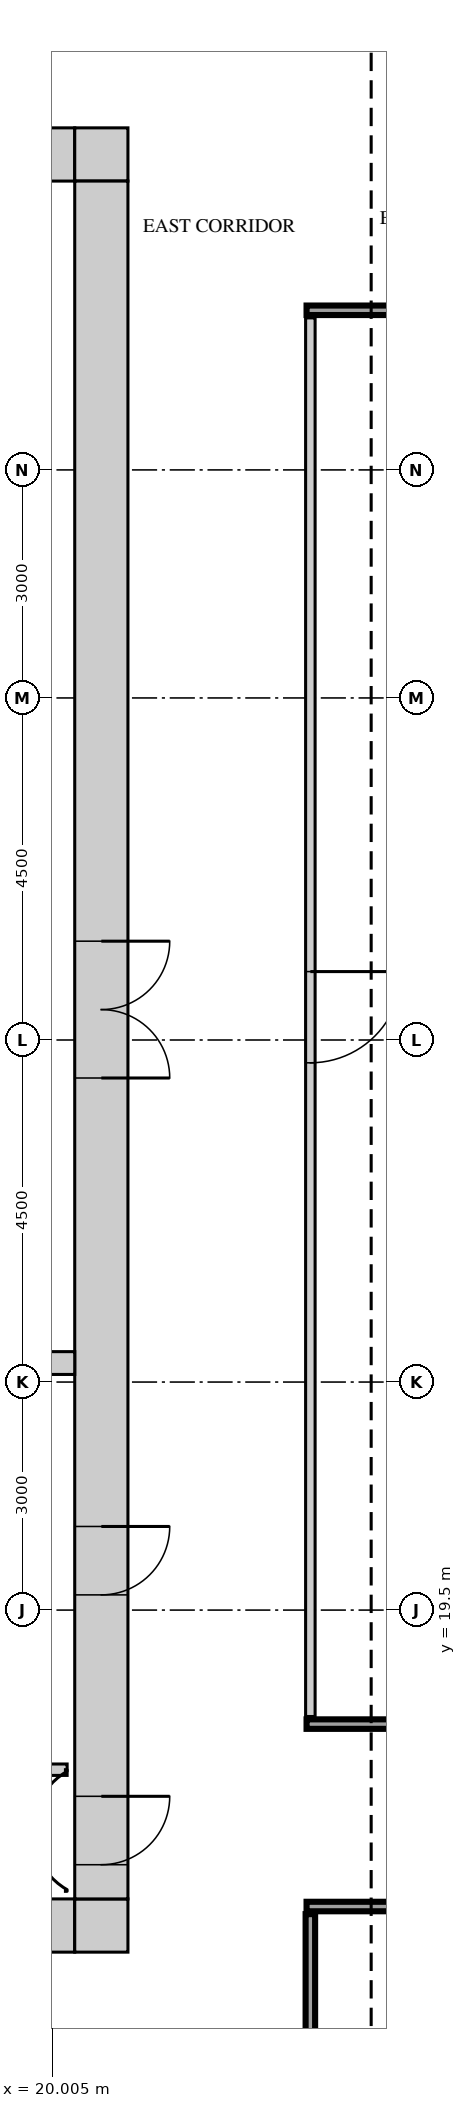
"""IFC4 building model, lengths in metres.
Left out: names, types, materials, properties, quantities, classifications, styles, units other than length and angle.
Written with IfcOpenShell. Run it as: python <this file> out.ifc"""

import sys

from ifc_helpers import new_model, si_unit, direction, frame, frame_2d, origin, place, context, subcontext, project, spatial, rectangle, extrude, source, transform, mapped, element, fill, save


model = new_model("IFC4")
c1 = context("Model", 3, precision=1e-05, world=origin(), true_north=direction((0.0, 1.0)))
c2 = subcontext(c1, "Body", "Model", "MODEL_VIEW")
j1 = project(units=[si_unit("LENGTHUNIT", "METRE"), si_unit("PLANEANGLEUNIT", "RADIAN")], contexts=[c1])
p1 = place(None, origin())
s1 = spatial("IfcSite", under=j1, at=p1, CompositionType="ELEMENT")
p2 = place(p1, origin())
s2 = spatial("IfcBuilding", under=s1, at=p2, CompositionType="ELEMENT")
p3 = place(p2, frame((0.0, 0.0, 270.2)))
s3 = spatial("IfcBuildingStorey", under=s2, at=p3, CompositionType="ELEMENT", Elevation=270.2)
m1 = source(origin(), c2, "Body", "SweptSolid", [
    extrude(rectangle(XDim=13.6, YDim=0.7, at=frame_2d((6.8, 0.0))), origin(), (0.0, 0.0, 1.0), 3.75),
])
p4 = place(p3, frame((6.7, 38.65, 0.0), z_axis=(0.0, 0.0, 1.0), x_axis=(1.0, 0.0, 0.0)))
e1 = element("IfcWall", 1, at=p4, inside=s3, PredefinedType="SHEAR", context=c2, shape_type="MappedRepresentation", body=[
    mapped(m1, transform((0.0, 0.0, 0.0))),
])
m2 = source(origin(), c2, "Body", "SweptSolid", [
    extrude(rectangle(XDim=0.9, YDim=2.1, at=frame_2d((0.45, 1.05))), frame((0.0, 0.36, 0.0), z_axis=(0.0, -1.0, 0.0), x_axis=(1.0, 0.0, 0.0)), (0.0, 0.0, 1.0), 0.72),
])
p5 = place(p4, frame((3.0, 0.0, 0.0)))
e2 = element("IfcOpeningElement", 2, at=p5, cuts=e1, PredefinedType="OPENING", context=c2, shape_type="MappedRepresentation", body=[
    mapped(m2, transform((0.0, 0.0, 0.0))),
])
p6 = place(p4, frame((8.0, 0.0, 0.0)))
e3 = element("IfcOpeningElement", 3, at=p6, cuts=e1, PredefinedType="OPENING", context=c2, shape_type="MappedRepresentation", body=[
    mapped(m2, transform((0.0, 0.0, 0.0))),
])
p7 = place(p4, frame((11.35, 0.0, 0.0)))
e4 = element("IfcOpeningElement", 4, at=p7, cuts=e1, PredefinedType="OPENING", context=c2, shape_type="MappedRepresentation", body=[
    mapped(m2, transform((0.0, 0.0, 0.0))),
])
m3 = source(origin(), c2, "Body", "SweptSolid", [
    extrude(rectangle(XDim=0.7, YDim=0.7, at=frame_2d((0.35, 0.0))), origin(), (0.0, 0.0, 1.0), 3.75),
])
p8 = place(p3, frame((20.3, 38.65, 0.0), z_axis=(0.0, 0.0, 1.0), x_axis=(1.0, 0.0, 0.0)))
e5 = element("IfcWall", 5, at=p8, inside=s3, PredefinedType="SHEAR", context=c2, shape_type="MappedRepresentation", body=[
    mapped(m3, transform((0.0, 0.0, 0.0))),
])
p9 = place(p3, frame((6.7, 15.35, 0.0), z_axis=(0.0, 0.0, 1.0), x_axis=(1.0, 0.0, 0.0)))
e6 = element("IfcWall", 6, at=p9, inside=s3, PredefinedType="SHEAR", context=c2, shape_type="MappedRepresentation", body=[
    mapped(m1, transform((0.0, 0.0, 0.0))),
])
m4 = source(origin(), c2, "Body", "SweptSolid", [
    extrude(rectangle(XDim=1.2, YDim=2.1, at=frame_2d((0.6, 1.05))), frame((0.0, 0.36, 0.0), z_axis=(0.0, -1.0, 0.0), x_axis=(1.0, 0.0, 0.0)), (0.0, 0.0, 1.0), 0.72),
])
p10 = place(p9, frame((5.5, 0.0, 0.0)))
e7 = element("IfcOpeningElement", 7, at=p10, cuts=e6, PredefinedType="OPENING", context=c2, shape_type="MappedRepresentation", body=[
    mapped(m4, transform((0.0, 0.0, 0.0))),
])
p11 = place(p9, frame((2.15, 0.0, 0.0)))
e8 = element("IfcOpeningElement", 8, at=p11, cuts=e6, PredefinedType="OPENING", context=c2, shape_type="MappedRepresentation", body=[
    mapped(m4, transform((0.0, 0.0, 0.0))),
])
m5 = source(origin(), c2, "Body", "SweptSolid", [
    extrude(rectangle(XDim=1.0, YDim=2.1, at=frame_2d((0.5, 1.05))), frame((0.0, 0.36, 0.0), z_axis=(0.0, -1.0, 0.0), x_axis=(1.0, 0.0, 0.0)), (0.0, 0.0, 1.0), 0.72),
])
p12 = place(p9, frame((8.0, 0.0, 0.0)))
e9 = element("IfcOpeningElement", 9, at=p12, cuts=e6, PredefinedType="OPENING", context=c2, shape_type="MappedRepresentation", body=[
    mapped(m5, transform((0.0, 0.0, 0.0))),
])
p13 = place(p3, frame((20.3, 15.35, 0.0), z_axis=(0.0, 0.0, 1.0), x_axis=(1.0, 0.0, 0.0)))
e10 = element("IfcWall", 10, at=p13, inside=s3, PredefinedType="SHEAR", context=c2, shape_type="MappedRepresentation", body=[
    mapped(m3, transform((0.0, 0.0, 0.0))),
])
m6 = source(origin(), c2, "Body", "SweptSolid", [
    extrude(rectangle(XDim=22.6, YDim=0.7, at=frame_2d((11.3, 0.0))), origin(), (0.0, 0.0, 1.0), 3.75),
])
p14 = place(p3, frame((20.65, 15.7, 0.0), z_axis=(0.0, 0.0, 1.0), x_axis=(0.0, 1.0, 0.0)))
e11 = element("IfcWall", 11, at=p14, inside=s3, PredefinedType="SHEAR", context=c2, shape_type="MappedRepresentation", body=[
    mapped(m6, transform((0.0, 0.0, 0.0))),
])
m7 = source(origin(), c2, "Body", "SweptSolid", [
    extrude(rectangle(XDim=1.8, YDim=2.1, at=frame_2d((0.9, 1.05))), frame((0.0, 0.36, 0.0), z_axis=(0.0, -1.0, 0.0), x_axis=(1.0, 0.0, 0.0)), (0.0, 0.0, 1.0), 0.72),
])
p15 = place(p14, frame((10.8, 0.0, 0.0)))
e12 = element("IfcOpeningElement", 12, at=p15, cuts=e11, PredefinedType="OPENING", context=c2, shape_type="MappedRepresentation", body=[
    mapped(m7, transform((0.0, 0.0, 0.0))),
])
p16 = place(p14, frame((0.45, 0.0, 0.0)))
e13 = element("IfcOpeningElement", 13, at=p16, cuts=e11, PredefinedType="OPENING", context=c2, shape_type="MappedRepresentation", body=[
    mapped(m2, transform((0.0, 0.0, 0.0))),
])
p17 = place(p14, frame((4.0, 0.0, 0.0)))
e14 = element("IfcOpeningElement", 14, at=p17, cuts=e11, PredefinedType="OPENING", context=c2, shape_type="MappedRepresentation", body=[
    mapped(m2, transform((0.0, 0.0, 0.0))),
])
m8 = source(origin(), c2, "Body", "SweptSolid", [
    extrude(rectangle(XDim=13.6, YDim=0.3, at=frame_2d((6.8, 0.0))), origin(), (0.0, 0.0, 1.0), 3.75),
])
p18 = place(p3, frame((6.7, 22.75, 0.0), z_axis=(0.0, 0.0, 1.0), x_axis=(1.0, 0.0, 0.0)))
e15 = element("IfcWall", 15, at=p18, inside=s3, PredefinedType="STANDARD", context=c2, shape_type="MappedRepresentation", body=[
    mapped(m8, transform((0.0, 0.0, 0.0))),
])
m9 = source(origin(), c2, "Body", "SweptSolid", [
    extrude(rectangle(XDim=10.85, YDim=0.125, at=frame_2d((5.425, 0.0))), origin(), (0.0, 0.0, 1.0), 3.8),
])
p19 = place(p3, frame((23.4, 4.65, 0.0), z_axis=(0.0, 0.0, 1.0), x_axis=(0.0, 1.0, 0.0)))
e16 = element("IfcWall", 16, at=p19, inside=s3, PredefinedType="PARTITIONING", context=c2, shape_type="MappedRepresentation", body=[
    mapped(m9, transform((0.0, 0.0, 0.0))),
])
m10 = source(origin(), c2, "Body", "SweptSolid", [
    extrude(rectangle(XDim=0.9, YDim=2.1, at=frame_2d((0.45, 1.05))), frame((0.0, 0.073, 0.0), z_axis=(0.0, -1.0, 0.0), x_axis=(1.0, 0.0, 0.0)), (0.0, 0.0, 1.0), 0.145),
])
p20 = place(p19, frame((4.5, 0.0, 0.0)))
e17 = element("IfcOpeningElement", 17, at=p20, cuts=e16, PredefinedType="OPENING", context=c2, shape_type="MappedRepresentation", body=[
    mapped(m10, transform((0.0, 0.0, 0.0))),
])
m11 = source(origin(), c2, "Body", "SweptSolid", [
    extrude(rectangle(XDim=26.0, YDim=0.125, at=frame_2d((13.0, 0.0))), origin(), (0.0, 0.0, 1.0), 3.8),
])
p21 = place(p3, frame((23.35, 15.6, 0.0), z_axis=(0.0, 0.0, 1.0), x_axis=(1.0, 0.0, 0.0)))
e18 = element("IfcWall", 18, at=p21, inside=s3, PredefinedType="PARTITIONING", context=c2, shape_type="MappedRepresentation", body=[
    mapped(m11, transform((0.0, 0.0, 0.0))),
])
p22 = place(p21, frame((4.05, 0.0, 0.0)))
e19 = element("IfcOpeningElement", 19, at=p22, cuts=e18, PredefinedType="OPENING", context=c2, shape_type="MappedRepresentation", body=[
    mapped(m10, transform((0.0, 0.0, 0.0))),
])
m12 = source(origin(), c2, "Body", "SweptSolid", [
    extrude(rectangle(XDim=1.0, YDim=2.1, at=frame_2d((0.5, 1.05))), frame((0.0, 0.073, 0.0), z_axis=(0.0, -1.0, 0.0), x_axis=(1.0, 0.0, 0.0)), (0.0, 0.0, 1.0), 0.145),
])
p23 = place(p21, frame((6.85, 0.0, 0.0)))
e20 = element("IfcOpeningElement", 20, at=p23, cuts=e18, PredefinedType="OPENING", context=c2, shape_type="MappedRepresentation", body=[
    mapped(m12, transform((0.0, 0.0, 0.0))),
])
p24 = place(p21, frame((12.3, 0.0, 0.0)))
e21 = element("IfcOpeningElement", 21, at=p24, cuts=e18, PredefinedType="OPENING", context=c2, shape_type="MappedRepresentation", body=[
    mapped(m10, transform((0.0, 0.0, 0.0))),
])
m13 = source(origin(), c2, "Body", "SweptSolid", [
    extrude(rectangle(XDim=1.2, YDim=2.1, at=frame_2d((0.6, 1.05))), frame((0.0, 0.073, 0.0), z_axis=(0.0, -1.0, 0.0), x_axis=(1.0, 0.0, 0.0)), (0.0, 0.0, 1.0), 0.145),
])
p25 = place(p21, frame((20.8, 0.0, 0.0)))
e22 = element("IfcOpeningElement", 22, at=p25, cuts=e18, PredefinedType="OPENING", context=c2, shape_type="MappedRepresentation", body=[
    mapped(m13, transform((0.0, 0.0, 0.0))),
])
m14 = source(origin(), c2, "Body", "SweptSolid", [
    extrude(rectangle(XDim=4.0, YDim=0.15, at=frame_2d((2.0, 0.0))), origin(), (0.0, 0.0, 1.0), 3.8),
])
p26 = place(p3, frame((16.2, 17.4, 0.0), z_axis=(0.0, 0.0, 1.0), x_axis=(1.0, 0.0, 0.0)))
e23 = element("IfcWall", 23, at=p26, inside=s3, PredefinedType="PARTITIONING", context=c2, shape_type="MappedRepresentation", body=[
    mapped(m14, transform((0.0, 0.0, 0.0))),
])
p27 = place(p3, frame((23.35, 18.0, 0.0), z_axis=(0.0, 0.0, 1.0), x_axis=(1.0, 0.0, 0.0)))
e24 = element("IfcWall", 24, at=p27, inside=s3, PredefinedType="PARTITIONING", context=c2, shape_type="MappedRepresentation", body=[
    mapped(m11, transform((0.0, 0.0, 0.0))),
])
p28 = place(p27, frame((19.55, 0.0, 0.0)))
e25 = element("IfcOpeningElement", 25, at=p28, cuts=e24, PredefinedType="OPENING", context=c2, shape_type="MappedRepresentation", body=[
    mapped(m13, transform((0.0, 0.0, 0.0))),
])
m15 = source(origin(), c2, "Body", "SweptSolid", [
    extrude(rectangle(XDim=18.4, YDim=0.125, at=frame_2d((9.2, 0.0))), origin(), (0.0, 0.0, 1.0), 3.8),
])
p29 = place(p3, frame((23.4, 18.1, 0.0), z_axis=(0.0, 0.0, 1.0), x_axis=(0.0, 1.0, 0.0)))
e26 = element("IfcWall", 26, at=p29, inside=s3, PredefinedType="PARTITIONING", context=c2, shape_type="MappedRepresentation", body=[
    mapped(m15, transform((0.0, 0.0, 0.0))),
])
p30 = place(p29, frame((8.6, 0.0, 0.0)))
e27 = element("IfcOpeningElement", 27, at=p30, cuts=e26, PredefinedType="OPENING", context=c2, shape_type="MappedRepresentation", body=[
    mapped(m13, transform((0.0, 0.0, 0.0))),
])
p31 = place(p3, frame((23.35, 36.6, 0.0), z_axis=(0.0, 0.0, 1.0), x_axis=(1.0, 0.0, 0.0)))
e28 = element("IfcWall", 28, at=p31, inside=s3, PredefinedType="PARTITIONING", context=c2, shape_type="MappedRepresentation", body=[
    mapped(m11, transform((0.0, 0.0, 0.0))),
])
m16 = source(origin(), c2, "Body", "SweptSolid", [
    extrude(rectangle(XDim=1.8, YDim=2.1, at=frame_2d((0.9, 1.05))), frame((0.0, 0.3, 0.0), z_axis=(0.0, -1.0, 0.0), x_axis=(1.0, 0.0, 0.0)), (0.0, 0.0, 1.0), 0.6),
])
p32 = place(p15, origin())
e29 = element("IfcDoor", 29, at=p32, inside=s3, OperationType="DOUBLE_DOOR_SINGLE_SWING", PredefinedType="DOOR", context=c2, shape_type="MappedRepresentation", body=[
    mapped(m16, transform((0.0, 0.0, 0.0))),
])
fill(e12, e29)
m17 = source(origin(), c2, "Body", "SweptSolid", [
    extrude(rectangle(XDim=0.9, YDim=2.1, at=frame_2d((0.45, 1.05))), frame((0.0, 0.3, 0.0), z_axis=(0.0, -1.0, 0.0), x_axis=(1.0, 0.0, 0.0)), (0.0, 0.0, 1.0), 0.6),
])
p33 = place(p16, origin())
e30 = element("IfcDoor", 30, at=p33, inside=s3, OperationType="SINGLE_SWING_RIGHT", PredefinedType="DOOR", context=c2, shape_type="MappedRepresentation", body=[
    mapped(m17, transform((0.0, 0.0, 0.0))),
])
fill(e13, e30)
p34 = place(p17, origin())
e31 = element("IfcDoor", 31, at=p34, inside=s3, OperationType="SINGLE_SWING_RIGHT", PredefinedType="DOOR", context=c2, shape_type="MappedRepresentation", body=[
    mapped(m17, transform((0.0, 0.0, 0.0))),
])
fill(e14, e31)
m18 = source(origin(), c2, "Body", "SweptSolid", [
    extrude(rectangle(XDim=1.2, YDim=2.1, at=frame_2d((0.6, 1.05))), frame((0.0, 0.025, 0.0), z_axis=(0.0, -1.0, 0.0), x_axis=(1.0, 0.0, 0.0)), (0.0, 0.0, 1.0), 0.05),
])
p35 = place(p30, origin())
e32 = element("IfcDoor", 32, at=p35, inside=s3, OperationType="SINGLE_SWING_RIGHT", PredefinedType="DOOR", context=c2, shape_type="MappedRepresentation", body=[
    mapped(m18, transform((0.0, 0.0, 0.0))),
])
fill(e27, e32)
save(model, sys.argv[1])
